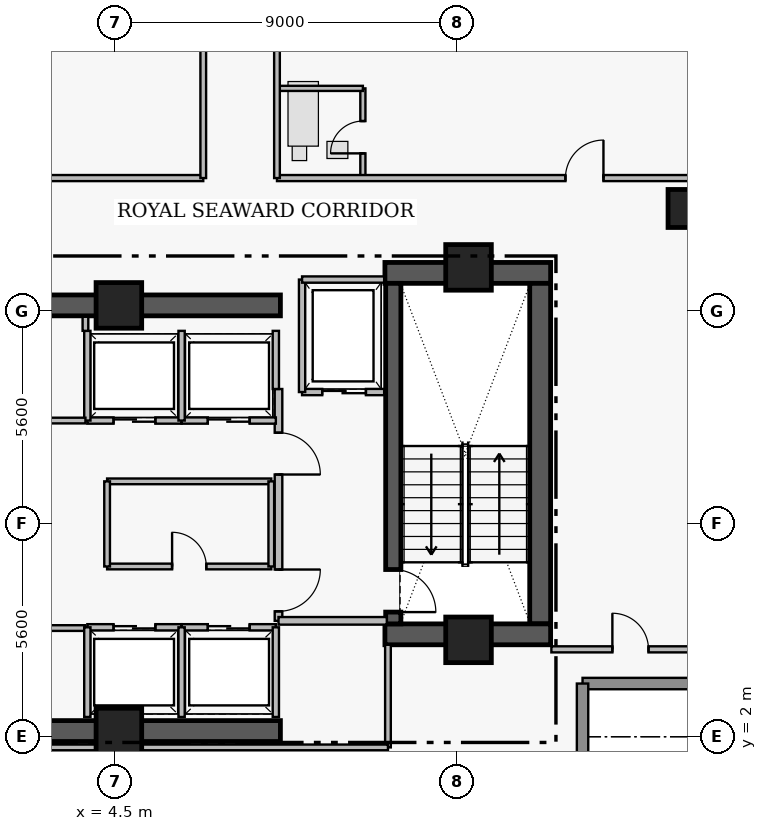
"""IFC4 building model, lengths in metres.
Left out: names, types, materials, properties, quantities, classifications, styles, units other than length and angle.
Written with IfcOpenShell. Run it as: python <this file> out.ifc"""

import sys

from ifc_helpers import new_model, si_unit, direction, frame, frame_2d, origin, origin_2d, place, context, subcontext, project, spatial, rectangle, extrude, element, fill, save


model = new_model("IFC4")
c1 = context("Model", 3, precision=1e-05, world=origin(), true_north=direction((0.0, 1.0)))
c2 = subcontext(c1, "Body", "Model", "MODEL_VIEW")
j1 = project(units=[si_unit("LENGTHUNIT", "METRE"), si_unit("PLANEANGLEUNIT", "RADIAN")], contexts=[c1])
p1 = place(None, origin())
s1 = spatial("IfcSite", under=j1, at=p1, CompositionType="ELEMENT")
p2 = place(p1, origin())
s2 = spatial("IfcBuilding", under=s1, at=p2, CompositionType="ELEMENT")
p3 = place(p2, frame((0.0, 0.0, 243.35)))
s3 = spatial("IfcBuildingStorey", under=s2, at=p3, CompositionType="ELEMENT", Elevation=243.35)
p4 = place(p3, frame((11.6, 14.205, 0.0), z_axis=(0.0, 0.0, 1.0), x_axis=(1.0, 0.0, 0.0)))
e1 = element("IfcWall", 1, at=p4, inside=s3, PredefinedType="SHEAR", context=c2, shape_type="SweptSolid", body=[
    extrude(rectangle(XDim=4.36, YDim=0.55, at=frame_2d((2.18, 0.0))), origin(), (0.0, 0.0, 1.0), 3.51),
])
p5 = place(p3, frame((15.685, 4.97, 0.0), z_axis=(0.0, 0.0, 1.0), x_axis=(0.0, 1.0, 0.0)))
e2 = element("IfcWall", 2, at=p5, inside=s3, PredefinedType="SHEAR", context=c2, shape_type="SweptSolid", body=[
    extrude(rectangle(XDim=8.96, YDim=0.55, at=frame_2d((4.48, 0.0))), origin(), (0.0, 0.0, 1.0), 3.51),
])
p6 = place(p3, frame((11.6, 4.695, 0.0), z_axis=(0.0, 0.0, 1.0), x_axis=(1.0, 0.0, 0.0)))
e3 = element("IfcWall", 3, at=p6, inside=s3, PredefinedType="SHEAR", context=c2, shape_type="SweptSolid", body=[
    extrude(rectangle(XDim=4.36, YDim=0.55, at=frame_2d((2.18, 0.0))), origin(), (0.0, 0.0, 1.0), 3.51),
])
for number, where, z_axis, x_axis in (
    (4, (1.25, 2.15, 0.0), (0.0, 0.0, 1.0), (1.0, 0.0, 0.0)),
    (5, (1.25, 13.35, 0.0), (0.0, 0.0, 1.0), (1.0, 0.0, 0.0)),
):
    element("IfcWall", number, at=place(p3, frame(where, z_axis=z_axis, x_axis=x_axis)), inside=s3, PredefinedType="SHEAR", context=c2, shape_type="SweptSolid", body=[
        extrude(rectangle(XDim=7.6, YDim=0.55, at=frame_2d((3.8, 0.0))), origin(), (0.0, 0.0, 1.0), 3.48),
    ])
p7 = place(p3, frame((11.82, 13.93, 0.0), z_axis=(0.0, 0.0, 1.0), x_axis=(0.0, -1.0, 0.0)))
e6 = element("IfcWall", 6, at=p7, inside=s3, PredefinedType="SHEAR", context=c2, shape_type="SweptSolid", body=[
    extrude(rectangle(XDim=8.96, YDim=0.4, at=frame_2d((4.48, 0.0))), origin(), (0.0, 0.0, 1.0), 3.51),
])
p8 = place(p7, frame((7.53, 0.0, 0.0)))
e7 = element("IfcOpeningElement", 7, at=p8, cuts=e6, PredefinedType="OPENING", context=c2, shape_type="SweptSolid", body=[
    extrude(rectangle(XDim=1.12, YDim=2.22, at=frame_2d((0.56, 1.11))), frame((0.0, 0.21, 0.0), z_axis=(0.0, -1.0, 0.0), x_axis=(1.0, 0.0, 0.0)), (0.0, 0.0, 1.0), 0.42),
])
for number, where, z_axis, x_axis in (
    (8, (4.6, 13.35, 0.0), (0.0, 0.0, 1.0), (1.0, 0.0, 0.0)),
    (9, (13.8, 14.35, 0.0), (0.0, 0.0, 1.0), (1.0, 0.0, 0.0)),
    (10, (4.6, 2.15, 0.0), (0.0, 0.0, 1.0), (1.0, 0.0, 0.0)),
    (11, (13.8, 4.55, 0.0), (0.0, 0.0, 1.0), (1.0, 0.0, 0.0)),
):
    element("IfcColumn", number, at=place(p3, frame(where, z_axis=z_axis, x_axis=x_axis)), inside=s3, PredefinedType="COLUMN", context=c2, shape_type="SweptSolid", body=[
        extrude(rectangle(XDim=1.2, YDim=1.2, at=origin_2d()), origin(), (0.0, 0.0, 1.0), 3.7),
    ])
p9 = place(p3, frame((19.55, 15.9, 0.0), z_axis=(0.0, 0.0, 1.0), x_axis=(1.0, 0.0, 0.0)))
e12 = element("IfcColumn", 12, at=p9, inside=s3, PredefinedType="COLUMN", context=c2, shape_type="SweptSolid", body=[
    extrude(rectangle(XDim=1.0, YDim=1.0, at=origin_2d()), origin(), (0.0, 0.0, 1.0), 3.7),
])
for number, where, z_axis, x_axis in (
    (13, (20.2, 3.4, 0.0), (0.0, 0.0, 1.0), (-1.0, 0.0, 0.0)),
    (14, (16.8, 3.4, 0.0), (0.0, 0.0, 1.0), (0.0, -1.0, 0.0)),
):
    element("IfcWall", number, at=place(p3, frame(where, z_axis=z_axis, x_axis=x_axis)), inside=s3, PredefinedType="STANDARD", context=c2, shape_type="SweptSolid", body=[
        extrude(rectangle(XDim=3.4, YDim=0.3, at=frame_2d((1.7, 0.0))), origin(), (0.0, 0.0, 1.0), 3.48),
    ])
p10 = place(p3, frame((8.8, 11.15, 0.0), z_axis=(0.0, 0.0, 1.0), x_axis=(0.0, -1.0, 0.0)))
e15 = element("IfcWall", 15, at=p10, inside=s3, PredefinedType="PARTITIONING", context=c2, shape_type="SweptSolid", body=[
    extrude(rectangle(XDim=6.1, YDim=0.2, at=frame_2d((3.05, 0.0))), origin(), (0.0, 0.0, 1.0), 3.48),
])
p11 = place(p10, frame((1.15, 0.0, 0.0)))
e16 = element("IfcOpeningElement", 16, at=p11, cuts=e15, PredefinedType="OPENING", context=c2, shape_type="SweptSolid", body=[
    extrude(rectangle(XDim=1.1, YDim=2.2, at=frame_2d((0.55, 1.1))), frame((0.0, 0.11, 0.0), z_axis=(0.0, -1.0, 0.0), x_axis=(1.0, 0.0, 0.0)), (0.0, 0.0, 1.0), 0.22),
])
p12 = place(p10, frame((4.75, 0.0, 0.0)))
e17 = element("IfcOpeningElement", 17, at=p12, cuts=e15, PredefinedType="OPENING", context=c2, shape_type="SweptSolid", body=[
    extrude(rectangle(XDim=1.1, YDim=2.2, at=frame_2d((0.55, 1.1))), frame((0.0, 0.11, 0.0), z_axis=(0.0, -1.0, 0.0), x_axis=(1.0, 0.0, 0.0)), (0.0, 0.0, 1.0), 0.22),
])
p13 = place(p3, frame((9.42, 11.07, 0.0), z_axis=(0.0, 0.0, 1.0), x_axis=(1.0, 0.0, 0.0)))
e18 = element("IfcWall", 18, at=p13, inside=s3, PredefinedType="PARTITIONING", context=c2, shape_type="SweptSolid", body=[
    extrude(rectangle(XDim=2.16, YDim=0.165, at=frame_2d((1.08, 0.0))), origin(), (0.0, 0.0, 1.0), 3.48),
])
p14 = place(p13, frame((0.53, 0.0, 0.0)))
e19 = element("IfcOpeningElement", 19, at=p14, cuts=e18, PredefinedType="OPENING", context=c2, shape_type="SweptSolid", body=[
    extrude(rectangle(XDim=1.15, YDim=2.25, at=frame_2d((0.575, 1.125))), frame((0.0, 0.093, 0.0), z_axis=(0.0, -1.0, 0.0), x_axis=(1.0, 0.0, 0.0)), (0.0, 0.0, 1.0), 0.185),
])
p15 = place(p3, frame((3.77, 4.88, 0.0), z_axis=(0.0, 0.0, 1.0), x_axis=(1.0, 0.0, 0.0)))
e20 = element("IfcWall", 20, at=p15, inside=s3, PredefinedType="PARTITIONING", context=c2, shape_type="SweptSolid", body=[
    extrude(rectangle(XDim=2.48, YDim=0.165, at=frame_2d((1.24, 0.0))), origin(), (0.0, 0.0, 1.0), 3.48),
])
p16 = place(p15, frame((0.69, 0.0, 0.0)))
e21 = element("IfcOpeningElement", 21, at=p16, cuts=e20, PredefinedType="OPENING", context=c2, shape_type="SweptSolid", body=[
    extrude(rectangle(XDim=1.1, YDim=2.25, at=frame_2d((0.55, 1.125))), frame((0.0, 0.093, 0.0), z_axis=(0.0, -1.0, 0.0), x_axis=(1.0, 0.0, 0.0)), (0.0, 0.0, 1.0), 0.185),
])
p17 = place(p3, frame((6.25, 4.88, 0.0), z_axis=(0.0, 0.0, 1.0), x_axis=(1.0, 0.0, 0.0)))
e22 = element("IfcWall", 22, at=p17, inside=s3, PredefinedType="PARTITIONING", context=c2, shape_type="SweptSolid", body=[
    extrude(rectangle(XDim=2.48, YDim=0.165, at=frame_2d((1.24, 0.0))), origin(), (0.0, 0.0, 1.0), 3.48),
])
p18 = place(p17, frame((0.69, 0.0, 0.0)))
e23 = element("IfcOpeningElement", 23, at=p18, cuts=e22, PredefinedType="OPENING", context=c2, shape_type="SweptSolid", body=[
    extrude(rectangle(XDim=1.1, YDim=2.25, at=frame_2d((0.55, 1.125))), frame((0.0, 0.093, 0.0), z_axis=(0.0, -1.0, 0.0), x_axis=(1.0, 0.0, 0.0)), (0.0, 0.0, 1.0), 0.185),
])
p19 = place(p3, frame((3.77, 10.32, 0.0), z_axis=(0.0, 0.0, 1.0), x_axis=(1.0, 0.0, 0.0)))
e24 = element("IfcWall", 24, at=p19, inside=s3, PredefinedType="PARTITIONING", context=c2, shape_type="SweptSolid", body=[
    extrude(rectangle(XDim=2.48, YDim=0.165, at=frame_2d((1.24, 0.0))), origin(), (0.0, 0.0, 1.0), 3.48),
])
p20 = place(p19, frame((0.69, 0.0, 0.0)))
e25 = element("IfcOpeningElement", 25, at=p20, cuts=e24, PredefinedType="OPENING", context=c2, shape_type="SweptSolid", body=[
    extrude(rectangle(XDim=1.1, YDim=2.25, at=frame_2d((0.55, 1.125))), frame((0.0, 0.093, 0.0), z_axis=(0.0, -1.0, 0.0), x_axis=(1.0, 0.0, 0.0)), (0.0, 0.0, 1.0), 0.185),
])
p21 = place(p3, frame((6.25, 10.32, 0.0), z_axis=(0.0, 0.0, 1.0), x_axis=(1.0, 0.0, 0.0)))
e26 = element("IfcWall", 26, at=p21, inside=s3, PredefinedType="PARTITIONING", context=c2, shape_type="SweptSolid", body=[
    extrude(rectangle(XDim=2.48, YDim=0.165, at=frame_2d((1.24, 0.0))), origin(), (0.0, 0.0, 1.0), 3.48),
])
p22 = place(p21, frame((0.69, 0.0, 0.0)))
e27 = element("IfcOpeningElement", 27, at=p22, cuts=e26, PredefinedType="OPENING", context=c2, shape_type="SweptSolid", body=[
    extrude(rectangle(XDim=1.1, YDim=2.25, at=frame_2d((0.55, 1.125))), frame((0.0, 0.093, 0.0), z_axis=(0.0, -1.0, 0.0), x_axis=(1.0, 0.0, 0.0)), (0.0, 0.0, 1.0), 0.185),
])
p23 = place(p3, frame((-0.26, 4.86, 0.0), z_axis=(0.0, 0.0, 1.0), x_axis=(1.0, 0.0, 0.0)))
e28 = element("IfcWall", 28, at=p23, inside=s3, PredefinedType="PARTITIONING", context=c2, shape_type="SweptSolid", body=[
    extrude(rectangle(XDim=3.97, YDim=0.15, at=frame_2d((1.985, 0.0))), origin(), (0.0, 0.0, 1.0), 3.48),
])
p24 = place(p23, frame((1.535, 0.0, 0.0)))
e29 = element("IfcOpeningElement", 29, at=p24, cuts=e28, PredefinedType="OPENING", context=c2, shape_type="SweptSolid", body=[
    extrude(rectangle(XDim=0.9, YDim=2.15, at=frame_2d((0.45, 1.075))), frame((0.0, 0.085, 0.0), z_axis=(0.0, -1.0, 0.0), x_axis=(1.0, 0.0, 0.0)), (0.0, 0.0, 1.0), 0.17),
])
p25 = place(p3, frame((4.29, 6.48, 0.0), z_axis=(0.0, 0.0, 1.0), x_axis=(1.0, 0.0, 0.0)))
e30 = element("IfcWall", 30, at=p25, inside=s3, PredefinedType="PARTITIONING", context=c2, shape_type="SweptSolid", body=[
    extrude(rectangle(XDim=4.32, YDim=0.15, at=frame_2d((2.16, 0.0))), origin(), (0.0, 0.0, 1.0), 3.48),
])
p26 = place(p25, frame((1.71, 0.0, 0.0)))
e31 = element("IfcOpeningElement", 31, at=p26, cuts=e30, PredefinedType="OPENING", context=c2, shape_type="SweptSolid", body=[
    extrude(rectangle(XDim=0.9, YDim=2.15, at=frame_2d((0.45, 1.075))), frame((0.0, 0.085, 0.0), z_axis=(0.0, -1.0, 0.0), x_axis=(1.0, 0.0, 0.0)), (0.0, 0.0, 1.0), 0.17),
])
p27 = place(p3, frame((15.98, 4.3, 0.0), z_axis=(0.0, 0.0, 1.0), x_axis=(1.0, 0.0, 0.0)))
e32 = element("IfcWall", 32, at=p27, inside=s3, PredefinedType="PARTITIONING", context=c2, shape_type="SweptSolid", body=[
    extrude(rectangle(XDim=4.16, YDim=0.16, at=frame_2d((2.08, 0.0))), origin(), (0.0, 0.0, 1.0), 3.48),
])
p28 = place(p27, frame((1.605, 0.0, 0.0)))
e33 = element("IfcOpeningElement", 33, at=p28, cuts=e32, PredefinedType="OPENING", context=c2, shape_type="SweptSolid", body=[
    extrude(rectangle(XDim=0.95, YDim=2.15, at=frame_2d((0.475, 1.075))), frame((0.0, 0.09, 0.0), z_axis=(0.0, -1.0, 0.0), x_axis=(1.0, 0.0, 0.0)), (0.0, 0.0, 1.0), 0.18),
])
p29 = place(p3, frame((-6.82, 16.7, 0.0), z_axis=(0.0, 0.0, 1.0), x_axis=(1.0, 0.0, 0.0)))
e34 = element("IfcWall", 34, at=p29, inside=s3, PredefinedType="PARTITIONING", context=c2, shape_type="SweptSolid", body=[
    extrude(rectangle(XDim=13.64, YDim=0.16, at=frame_2d((6.82, 0.0))), origin(), (0.0, 0.0, 1.0), 3.076),
])
p30 = place(p29, frame((6.28, 0.0, 0.0)))
e35 = element("IfcOpeningElement", 35, at=p30, cuts=e34, PredefinedType="OPENING", context=c2, shape_type="SweptSolid", body=[
    extrude(rectangle(XDim=1.08, YDim=2.18, at=frame_2d((0.54, 1.09))), frame((0.0, 0.09, 0.0), z_axis=(0.0, -1.0, 0.0), x_axis=(1.0, 0.0, 0.0)), (0.0, 0.0, 1.0), 0.18),
])
p31 = place(p3, frame((11.02, 16.7, 0.0), z_axis=(0.0, 0.0, 1.0), x_axis=(0.0, 1.0, 0.0)))
e36 = element("IfcWall", 36, at=p31, inside=s3, PredefinedType="PLUMBINGWALL", context=c2, shape_type="SweptSolid", body=[
    extrude(rectangle(XDim=2.36, YDim=0.135, at=frame_2d((1.18, 0.0))), origin(), (0.0, 0.0, 1.0), 3.48),
])
p32 = place(p31, frame((0.65, 0.0, 0.0)))
e37 = element("IfcOpeningElement", 37, at=p32, cuts=e36, PredefinedType="OPENING", context=c2, shape_type="SweptSolid", body=[
    extrude(rectangle(XDim=0.85, YDim=2.1, at=frame_2d((0.425, 1.05))), frame((0.0, 0.077, 0.0), z_axis=(0.0, -1.0, 0.0), x_axis=(1.0, 0.0, 0.0)), (0.0, 0.0, 1.0), 0.155),
])
p33 = place(p3, frame((8.76, 16.7, 0.0), z_axis=(0.0, 0.0, 1.0), x_axis=(1.0, 0.0, 0.0)))
e38 = element("IfcWall", 38, at=p33, inside=s3, PredefinedType="PARTITIONING", context=c2, shape_type="SweptSolid", body=[
    extrude(rectangle(XDim=13.88, YDim=0.16, at=frame_2d((6.94, 0.0))), origin(), (0.0, 0.0, 1.0), 3.076),
])
p34 = place(p33, frame((7.59, 0.0, 0.0)))
e39 = element("IfcOpeningElement", 39, at=p34, cuts=e38, PredefinedType="OPENING", context=c2, shape_type="SweptSolid", body=[
    extrude(rectangle(XDim=1.0, YDim=2.15, at=frame_2d((0.5, 1.075))), frame((0.0, 0.09, 0.0), z_axis=(0.0, -1.0, 0.0), x_axis=(1.0, 0.0, 0.0)), (0.0, 0.0, 1.0), 0.18),
])
p35 = place(p3, frame((8.8, 5.05, 0.0), z_axis=(0.0, 0.0, 1.0), x_axis=(1.0, 0.0, 0.0)))
e40 = element("IfcWall", 40, at=p35, inside=s3, PredefinedType="PARTITIONING", context=c2, shape_type="SweptSolid", body=[
    extrude(rectangle(XDim=2.85, YDim=0.2, at=frame_2d((1.425, 0.0))), origin(), (0.0, 0.0, 1.0), 3.48),
])
p36 = place(p3, frame((9.42, 11.07, 0.0), z_axis=(0.0, 0.0, 1.0), x_axis=(0.0, 1.0, 0.0)))
e41 = element("IfcWall", 41, at=p36, inside=s3, PredefinedType="PARTITIONING", context=c2, shape_type="SweptSolid", body=[
    extrude(rectangle(XDim=2.96, YDim=0.165, at=frame_2d((1.48, 0.0))), origin(), (0.0, 0.0, 1.0), 3.48),
])
p37 = place(p3, frame((9.42, 14.03, 0.0), z_axis=(0.0, 0.0, 1.0), x_axis=(1.0, 0.0, 0.0)))
e42 = element("IfcWall", 42, at=p37, inside=s3, PredefinedType="PARTITIONING", context=c2, shape_type="SweptSolid", body=[
    extrude(rectangle(XDim=2.16, YDim=0.165, at=frame_2d((1.08, 0.0))), origin(), (0.0, 0.0, 1.0), 3.48),
])
for number, where, z_axis, x_axis in (
    (43, (3.77, 2.52, 0.0), (0.0, 0.0, 1.0), (0.0, 1.0, 0.0)),
    (44, (6.25, 2.52, 0.0), (0.0, 0.0, 1.0), (0.0, 1.0, 0.0)),
    (45, (8.73, 2.52, 0.0), (0.0, 0.0, 1.0), (0.0, 1.0, 0.0)),
    (46, (3.77, 10.32, 0.0), (0.0, 0.0, 1.0), (0.0, 1.0, 0.0)),
    (47, (6.25, 10.32, 0.0), (0.0, 0.0, 1.0), (0.0, 1.0, 0.0)),
):
    element("IfcWall", number, at=place(p3, frame(where, z_axis=z_axis, x_axis=x_axis)), inside=s3, PredefinedType="PARTITIONING", context=c2, shape_type="SweptSolid", body=[
        extrude(rectangle(XDim=2.36, YDim=0.165, at=frame_2d((1.18, 0.0))), origin(), (0.0, 0.0, 1.0), 3.48),
    ])
p38 = place(p3, frame((8.73, 11.15, 0.0), z_axis=(0.0, 0.0, 1.0), x_axis=(0.0, 1.0, 0.0)))
e48 = element("IfcWall", 48, at=p38, inside=s3, PredefinedType="PARTITIONING", context=c2, shape_type="SweptSolid", body=[
    extrude(rectangle(XDim=1.53, YDim=0.165, at=frame_2d((0.765, 0.0))), origin(), (0.0, 0.0, 1.0), 3.48),
])
p39 = place(p3, frame((4.29, 8.72, 0.0), z_axis=(0.0, 0.0, 1.0), x_axis=(1.0, 0.0, 0.0)))
e49 = element("IfcWall", 49, at=p39, inside=s3, PredefinedType="PARTITIONING", context=c2, shape_type="SweptSolid", body=[
    extrude(rectangle(XDim=4.32, YDim=0.15, at=frame_2d((2.16, 0.0))), origin(), (0.0, 0.0, 1.0), 3.48),
])
for number, where, z_axis, x_axis in (
    (50, (4.29, 6.48, 0.0), (0.0, 0.0, 1.0), (0.0, 1.0, 0.0)),
    (51, (8.61, 6.48, 0.0), (0.0, 0.0, 1.0), (0.0, 1.0, 0.0)),
):
    element("IfcWall", number, at=place(p3, frame(where, z_axis=z_axis, x_axis=x_axis)), inside=s3, PredefinedType="PARTITIONING", context=c2, shape_type="SweptSolid", body=[
        extrude(rectangle(XDim=2.24, YDim=0.15, at=frame_2d((1.12, 0.0))), origin(), (0.0, 0.0, 1.0), 3.48),
    ])
p40 = place(p3, frame((1.18, 10.32, 0.0), z_axis=(0.0, 0.0, 1.0), x_axis=(1.0, 0.0, 0.0)))
e52 = element("IfcWall", 52, at=p40, inside=s3, PredefinedType="PARTITIONING", context=c2, shape_type="SweptSolid", body=[
    extrude(rectangle(XDim=2.54, YDim=0.15, at=frame_2d((1.27, 0.0))), origin(), (0.0, 0.0, 1.0), 3.48),
])
p41 = place(p3, frame((3.72, 12.68, 0.0), z_axis=(0.0, 0.0, 1.0), x_axis=(0.0, 1.0, 0.0)))
e53 = element("IfcWall", 53, at=p41, inside=s3, PredefinedType="PARTITIONING", context=c2, shape_type="SweptSolid", body=[
    extrude(rectangle(XDim=0.37, YDim=0.15, at=frame_2d((0.185, 0.0))), origin(), (0.0, 0.0, 1.0), 3.48),
])
p42 = place(p3, frame((11.68, 1.72, 0.0), z_axis=(0.0, 0.0, 1.0), x_axis=(0.0, 1.0, 0.0)))
e54 = element("IfcWall", 54, at=p42, inside=s3, PredefinedType="PARTITIONING", context=c2, shape_type="SweptSolid", body=[
    extrude(rectangle(XDim=2.7, YDim=0.15, at=frame_2d((1.35, 0.0))), origin(), (0.0, 0.0, 1.0), 3.48),
])
p43 = place(p3, frame((0.0, 1.72, 0.0), z_axis=(0.0, 0.0, 1.0), x_axis=(1.0, 0.0, 0.0)))
e55 = element("IfcWall", 55, at=p43, inside=s3, PredefinedType="PARTITIONING", context=c2, shape_type="SweptSolid", body=[
    extrude(rectangle(XDim=11.68, YDim=0.15, at=frame_2d((5.84, 0.0))), origin(), (0.0, 0.0, 1.0), 2.38),
])
p44 = place(p3, frame((6.82, 16.7, 0.0), z_axis=(0.0, 0.0, 1.0), x_axis=(0.0, 1.0, 0.0)))
e56 = element("IfcWall", 56, at=p44, inside=s3, PredefinedType="PARTITIONING", context=c2, shape_type="SweptSolid", body=[
    extrude(rectangle(XDim=10.22, YDim=0.15, at=frame_2d((5.11, 0.0))), origin(), (0.0, 0.0, 1.0), 3.48),
])
p45 = place(p3, frame((8.76, 19.06, 0.0), z_axis=(0.0, 0.0, 1.0), x_axis=(1.0, 0.0, 0.0)))
e57 = element("IfcWall", 57, at=p45, inside=s3, PredefinedType="PLUMBINGWALL", context=c2, shape_type="SweptSolid", body=[
    extrude(rectangle(XDim=2.26, YDim=0.135, at=frame_2d((1.13, 0.0))), origin(), (0.0, 0.0, 1.0), 3.076),
])
p46 = place(p3, frame((8.76, 16.7, 0.0), z_axis=(0.0, 0.0, 1.0), x_axis=(0.0, 1.0, 0.0)))
e58 = element("IfcWall", 58, at=p46, inside=s3, PredefinedType="PARTITIONING", context=c2, shape_type="SweptSolid", body=[
    extrude(rectangle(XDim=12.68, YDim=0.15, at=frame_2d((6.34, 0.0))), origin(), (0.0, 0.0, 1.0), 3.48),
])
p47 = place(p8, origin())
e59 = element("IfcDoor", 59, at=p47, inside=s3, OperationType="SINGLE_SWING_RIGHT", PredefinedType="DOOR", context=c2, shape_type="SweptSolid", body=[
    extrude(rectangle(XDim=1.12, YDim=2.22, at=frame_2d((0.56, 1.11))), frame((0.0, 0.025, 0.0), z_axis=(0.0, -1.0, 0.0), x_axis=(1.0, 0.0, 0.0)), (0.0, 0.0, 1.0), 0.05),
])
fill(e7, e59)
p48 = place(p11, origin())
e60 = element("IfcDoor", 60, at=p48, inside=s3, OperationType="SINGLE_SWING_RIGHT", PredefinedType="DOOR", context=c2, shape_type="SweptSolid", body=[
    extrude(rectangle(XDim=1.1, YDim=2.2, at=frame_2d((0.55, 1.1))), frame((0.0, 0.025, 0.0), z_axis=(0.0, -1.0, 0.0), x_axis=(1.0, 0.0, 0.0)), (0.0, 0.0, 1.0), 0.05),
])
fill(e16, e60)
p49 = place(p12, origin())
e61 = element("IfcDoor", 61, at=p49, inside=s3, OperationType="SINGLE_SWING_LEFT", PredefinedType="DOOR", context=c2, shape_type="SweptSolid", body=[
    extrude(rectangle(XDim=1.1, YDim=2.2, at=frame_2d((0.55, 1.1))), frame((0.0, 0.025, 0.0), z_axis=(0.0, -1.0, 0.0), x_axis=(1.0, 0.0, 0.0)), (0.0, 0.0, 1.0), 0.05),
])
fill(e17, e61)
p50 = place(p14, origin())
e62 = element("IfcDoor", 62, at=p50, inside=s3, OperationType="SLIDING_TO_LEFT", PredefinedType="DOOR", context=c2, shape_type="SweptSolid", body=[
    extrude(rectangle(XDim=1.15, YDim=2.25, at=frame_2d((0.575, 1.125))), frame((0.0, 0.025, 0.0), z_axis=(0.0, -1.0, 0.0), x_axis=(1.0, 0.0, 0.0)), (0.0, 0.0, 1.0), 0.05),
])
fill(e19, e62)
p51 = place(p16, origin())
e63 = element("IfcDoor", 63, at=p51, inside=s3, OperationType="SLIDING_TO_LEFT", PredefinedType="DOOR", context=c2, shape_type="SweptSolid", body=[
    extrude(rectangle(XDim=1.1, YDim=2.25, at=frame_2d((0.55, 1.125))), frame((0.0, 0.025, 0.0), z_axis=(0.0, -1.0, 0.0), x_axis=(1.0, 0.0, 0.0)), (0.0, 0.0, 1.0), 0.05),
])
fill(e21, e63)
p52 = place(p18, origin())
e64 = element("IfcDoor", 64, at=p52, inside=s3, OperationType="SLIDING_TO_LEFT", PredefinedType="DOOR", context=c2, shape_type="SweptSolid", body=[
    extrude(rectangle(XDim=1.1, YDim=2.25, at=frame_2d((0.55, 1.125))), frame((0.0, 0.025, 0.0), z_axis=(0.0, -1.0, 0.0), x_axis=(1.0, 0.0, 0.0)), (0.0, 0.0, 1.0), 0.05),
])
fill(e23, e64)
p53 = place(p20, origin())
e65 = element("IfcDoor", 65, at=p53, inside=s3, OperationType="SLIDING_TO_LEFT", PredefinedType="DOOR", context=c2, shape_type="SweptSolid", body=[
    extrude(rectangle(XDim=1.1, YDim=2.25, at=frame_2d((0.55, 1.125))), frame((0.0, 0.025, 0.0), z_axis=(0.0, -1.0, 0.0), x_axis=(1.0, 0.0, 0.0)), (0.0, 0.0, 1.0), 0.05),
])
fill(e25, e65)
p54 = place(p22, origin())
e66 = element("IfcDoor", 66, at=p54, inside=s3, OperationType="SLIDING_TO_LEFT", PredefinedType="DOOR", context=c2, shape_type="SweptSolid", body=[
    extrude(rectangle(XDim=1.1, YDim=2.25, at=frame_2d((0.55, 1.125))), frame((0.0, 0.025, 0.0), z_axis=(0.0, -1.0, 0.0), x_axis=(1.0, 0.0, 0.0)), (0.0, 0.0, 1.0), 0.05),
])
fill(e27, e66)
p55 = place(p26, origin())
e67 = element("IfcDoor", 67, at=p55, inside=s3, OperationType="SINGLE_SWING_LEFT", PredefinedType="DOOR", context=c2, shape_type="SweptSolid", body=[
    extrude(rectangle(XDim=0.9, YDim=2.15, at=frame_2d((0.45, 1.075))), frame((0.0, 0.025, 0.0), z_axis=(0.0, -1.0, 0.0), x_axis=(1.0, 0.0, 0.0)), (0.0, 0.0, 1.0), 0.05),
])
fill(e31, e67)
p56 = place(p28, origin())
e68 = element("IfcDoor", 68, at=p56, inside=s3, OperationType="SINGLE_SWING_LEFT", PredefinedType="DOOR", context=c2, shape_type="SweptSolid", body=[
    extrude(rectangle(XDim=0.95, YDim=2.15, at=frame_2d((0.475, 1.075))), frame((0.0, 0.025, 0.0), z_axis=(0.0, -1.0, 0.0), x_axis=(1.0, 0.0, 0.0)), (0.0, 0.0, 1.0), 0.05),
])
fill(e33, e68)
p57 = place(p32, origin())
e69 = element("IfcDoor", 69, at=p57, inside=s3, OperationType="SINGLE_SWING_LEFT", PredefinedType="DOOR", context=c2, shape_type="SweptSolid", body=[
    extrude(rectangle(XDim=0.85, YDim=2.1, at=frame_2d((0.425, 1.05))), frame((0.0, 0.025, 0.0), z_axis=(0.0, -1.0, 0.0), x_axis=(1.0, 0.0, 0.0)), (0.0, 0.0, 1.0), 0.05),
])
fill(e37, e69)
p58 = place(p34, origin())
e70 = element("IfcDoor", 70, at=p58, inside=s3, OperationType="SINGLE_SWING_RIGHT", PredefinedType="DOOR", context=c2, shape_type="SweptSolid", body=[
    extrude(rectangle(XDim=1.0, YDim=2.15, at=frame_2d((0.5, 1.075))), frame((0.0, 0.025, 0.0), z_axis=(0.0, -1.0, 0.0), x_axis=(1.0, 0.0, 0.0)), (0.0, 0.0, 1.0), 0.05),
])
fill(e39, e70)
save(model, sys.argv[1])
